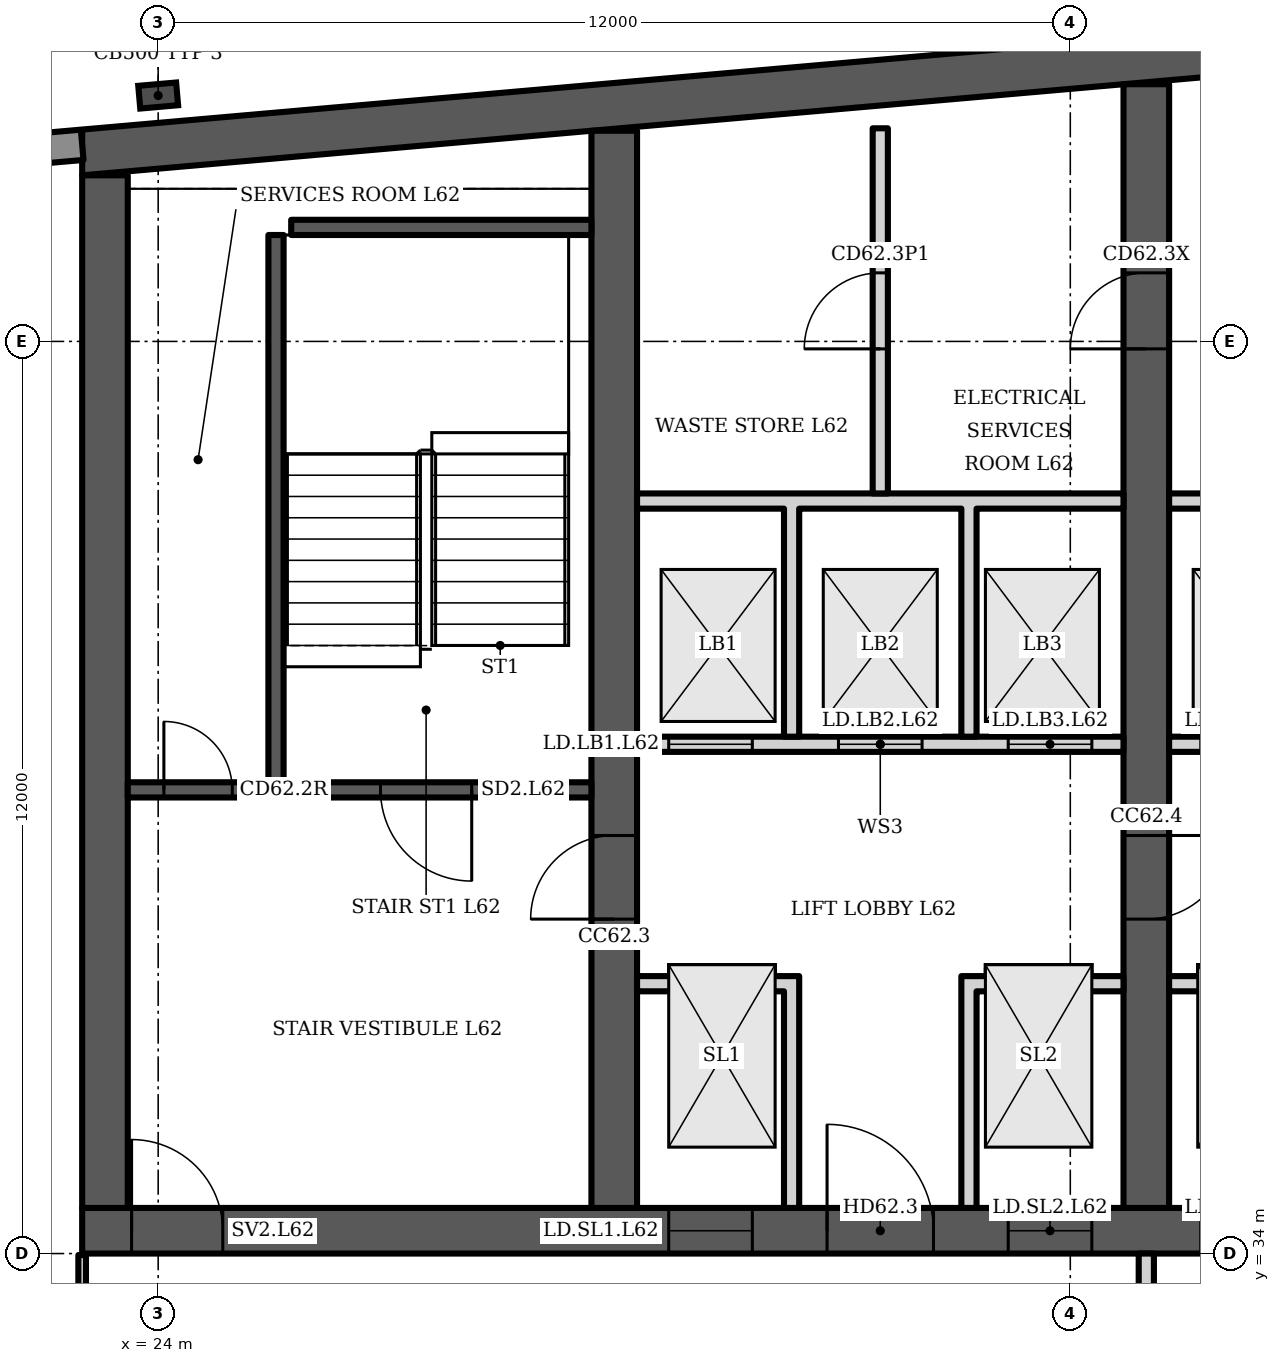
"""IFC4 building model, lengths in metres.
Left out: names, types, materials, properties, quantities, classifications, styles, units other than length and angle.
Written with IfcOpenShell. Run it as: python <this file> out.ifc"""

import sys

from ifc_helpers import new_model, si_unit, direction, frame, frame_2d, origin, origin_2d, place, context, subcontext, project, spatial, polyline, rectangle, i_section, outline, extrude, element, fill, save


model = new_model("IFC4")
c1 = context("Model", 3, precision=1e-05, world=origin(), true_north=direction((0.0, 1.0)))
c2 = subcontext(c1, "Body", "Model", "MODEL_VIEW")
j1 = project(units=[si_unit("LENGTHUNIT", "METRE"), si_unit("PLANEANGLEUNIT", "RADIAN")], contexts=[c1])
p1 = place(None, origin())
s1 = spatial("IfcSite", under=j1, at=p1, CompositionType="ELEMENT")
p2 = place(p1, origin())
s2 = spatial("IfcBuilding", under=s1, at=p2, CompositionType="ELEMENT")
p3 = place(p2, frame((0.0, 0.0, 246.7)))
s3 = spatial("IfcBuildingStorey", under=s2, at=p3, CompositionType="ELEMENT", Elevation=246.7)
p4 = place(p3, origin())
e1 = element("IfcWall", 1, at=p4, inside=s3, PredefinedType="SHEAR", context=c2, shape_type="SweptSolid", body=[
    extrude(outline(polyline([(23.0, 48.185), (40.5, 49.716), (58.0, 48.185), (58.0, 48.787), (40.5, 50.318), (23.0, 48.787), (23.0, 48.185)])), origin(), (0.0, 0.0, 1.0), 3.6),
])
p5 = place(p3, frame((23.0, 34.3, 0.0), z_axis=(0.0, 0.0, 1.0), x_axis=(1.0, 0.0, 0.0)))
e2 = element("IfcWall", 2, at=p5, inside=s3, PredefinedType="SHEAR", context=c2, shape_type="SweptSolid", body=[
    extrude(rectangle(XDim=35.0, YDim=0.6, at=frame_2d((17.5, 0.0))), origin(), (0.0, 0.0, 1.0), 3.6),
])
p6 = place(p5, frame((0.65, 0.0, 0.0)))
e3 = element("IfcOpeningElement", 3, at=p6, cuts=e2, PredefinedType="OPENING", context=c2, shape_type="SweptSolid", body=[
    extrude(rectangle(XDim=1.2, YDim=2.1, at=frame_2d((0.6, 1.05))), frame((0.0, 0.31, 0.0), z_axis=(0.0, -1.0, 0.0), x_axis=(1.0, 0.0, 0.0)), (0.0, 0.0, 1.0), 0.62),
])
p7 = place(p5, frame((7.717, 0.0, 0.0)))
e4 = element("IfcOpeningElement", 4, at=p7, cuts=e2, PredefinedType="OPENING", context=c2, shape_type="SweptSolid", body=[
    extrude(rectangle(XDim=1.1, YDim=2.1, at=frame_2d((0.55, 1.05))), frame((0.0, 0.31, 0.0), z_axis=(0.0, -1.0, 0.0), x_axis=(1.0, 0.0, 0.0)), (0.0, 0.0, 1.0), 0.62),
])
p8 = place(p5, frame((12.183, 0.0, 0.0)))
e5 = element("IfcOpeningElement", 5, at=p8, cuts=e2, PredefinedType="OPENING", context=c2, shape_type="SweptSolid", body=[
    extrude(rectangle(XDim=1.1, YDim=2.1, at=frame_2d((0.55, 1.05))), frame((0.0, 0.31, 0.0), z_axis=(0.0, -1.0, 0.0), x_axis=(1.0, 0.0, 0.0)), (0.0, 0.0, 1.0), 0.62),
])
p9 = place(p5, frame((9.8, 0.0, 0.0)))
e6 = element("IfcOpeningElement", 6, at=p9, cuts=e2, PredefinedType="OPENING", context=c2, shape_type="SweptSolid", body=[
    extrude(rectangle(XDim=1.4, YDim=2.1, at=frame_2d((0.7, 1.05))), frame((0.0, 0.31, 0.0), z_axis=(0.0, -1.0, 0.0), x_axis=(1.0, 0.0, 0.0)), (0.0, 0.0, 1.0), 0.62),
])
p10 = place(p5, frame((14.717, 0.0, 0.0)))
e7 = element("IfcOpeningElement", 7, at=p10, cuts=e2, PredefinedType="OPENING", context=c2, shape_type="SweptSolid", body=[
    extrude(rectangle(XDim=1.1, YDim=2.1, at=frame_2d((0.55, 1.05))), frame((0.0, 0.31, 0.0), z_axis=(0.0, -1.0, 0.0), x_axis=(1.0, 0.0, 0.0)), (0.0, 0.0, 1.0), 0.62),
])
p11 = place(p5, frame((16.95, 0.0, 0.0)))
e8 = element("IfcOpeningElement", 8, at=p11, cuts=e2, PredefinedType="OPENING", context=c2, shape_type="SweptSolid", body=[
    extrude(rectangle(XDim=1.1, YDim=2.1, at=frame_2d((0.55, 1.05))), frame((0.0, 0.31, 0.0), z_axis=(0.0, -1.0, 0.0), x_axis=(1.0, 0.0, 0.0)), (0.0, 0.0, 1.0), 0.62),
])
p12 = place(p5, frame((19.183, 0.0, 0.0)))
e9 = element("IfcOpeningElement", 9, at=p12, cuts=e2, PredefinedType="OPENING", context=c2, shape_type="SweptSolid", body=[
    extrude(rectangle(XDim=1.1, YDim=2.1, at=frame_2d((0.55, 1.05))), frame((0.0, 0.31, 0.0), z_axis=(0.0, -1.0, 0.0), x_axis=(1.0, 0.0, 0.0)), (0.0, 0.0, 1.0), 0.62),
])
p13 = place(p5, frame((26.15, 0.0, 0.0)))
e10 = element("IfcOpeningElement", 10, at=p13, cuts=e2, PredefinedType="OPENING", context=c2, shape_type="SweptSolid", body=[
    extrude(rectangle(XDim=1.2, YDim=2.1, at=frame_2d((0.6, 1.05))), frame((0.0, 0.31, 0.0), z_axis=(0.0, -1.0, 0.0), x_axis=(1.0, 0.0, 0.0)), (0.0, 0.0, 1.0), 0.62),
])
p14 = place(p5, frame((30.8, 0.0, 0.0)))
e11 = element("IfcOpeningElement", 11, at=p14, cuts=e2, PredefinedType="OPENING", context=c2, shape_type="SweptSolid", body=[
    extrude(rectangle(XDim=1.4, YDim=2.1, at=frame_2d((0.7, 1.05))), frame((0.0, 0.31, 0.0), z_axis=(0.0, -1.0, 0.0), x_axis=(1.0, 0.0, 0.0)), (0.0, 0.0, 1.0), 0.62),
])
p15 = place(p3, frame((23.3, 34.6, 0.0), z_axis=(0.0, 0.0, 1.0), x_axis=(0.0, 1.0, 0.0)))
e12 = element("IfcWall", 12, at=p15, inside=s3, PredefinedType="SHEAR", context=c2, shape_type="SweptSolid", body=[
    extrude(rectangle(XDim=13.585, YDim=0.6, at=frame_2d((6.792, 0.0))), origin(), (0.0, 0.0, 1.0), 3.6),
])
p16 = place(p3, frame((30.0, 34.6, 0.0), z_axis=(0.0, 0.0, 1.0), x_axis=(0.0, 1.0, 0.0)))
e13 = element("IfcWall", 13, at=p16, inside=s3, PredefinedType="SHEAR", context=c2, shape_type="SweptSolid", body=[
    extrude(rectangle(XDim=14.171, YDim=0.6, at=frame_2d((7.085, 0.0))), origin(), (0.0, 0.0, 1.0), 3.6),
])
p17 = place(p16, frame((3.8, 0.0, 0.0)))
e14 = element("IfcOpeningElement", 14, at=p17, cuts=e13, PredefinedType="OPENING", context=c2, shape_type="SweptSolid", body=[
    extrude(rectangle(XDim=1.1, YDim=2.1, at=frame_2d((0.55, 1.05))), frame((0.0, 0.31, 0.0), z_axis=(0.0, -1.0, 0.0), x_axis=(1.0, 0.0, 0.0)), (0.0, 0.0, 1.0), 0.62),
])
p18 = place(p3, frame((37.0, 34.6, 0.0), z_axis=(0.0, 0.0, 1.0), x_axis=(0.0, 1.0, 0.0)))
e15 = element("IfcWall", 15, at=p18, inside=s3, PredefinedType="SHEAR", context=c2, shape_type="SweptSolid", body=[
    extrude(rectangle(XDim=14.784, YDim=0.6, at=frame_2d((7.392, 0.0))), origin(), (0.0, 0.0, 1.0), 3.6),
])
p19 = place(p18, frame((11.302, 0.0, 0.0)))
e16 = element("IfcOpeningElement", 16, at=p19, cuts=e15, PredefinedType="OPENING", context=c2, shape_type="SweptSolid", body=[
    extrude(rectangle(XDim=1.0, YDim=2.1, at=frame_2d((0.5, 1.05))), frame((0.0, 0.31, 0.0), z_axis=(0.0, -1.0, 0.0), x_axis=(1.0, 0.0, 0.0)), (0.0, 0.0, 1.0), 0.62),
])
p20 = place(p18, frame((3.8, 0.0, 0.0)))
e17 = element("IfcOpeningElement", 17, at=p20, cuts=e15, PredefinedType="OPENING", context=c2, shape_type="SweptSolid", body=[
    extrude(rectangle(XDim=1.1, YDim=2.1, at=frame_2d((0.55, 1.05))), frame((0.0, 0.31, 0.0), z_axis=(0.0, -1.0, 0.0), x_axis=(1.0, 0.0, 0.0)), (0.0, 0.0, 1.0), 0.62),
])
p21 = place(p3, frame((24.0, 49.235, 0.0), z_axis=(0.0, 0.0, 1.0), x_axis=(-0.087156, 0.996197, 0.0)))
e18 = element("IfcColumn", 18, at=p21, inside=s3, PredefinedType="COLUMN", context=c2, shape_type="SweptSolid", body=[
    extrude(i_section(OverallWidth=0.3, OverallDepth=0.5, WebThickness=0.014, FlangeThickness=0.028, FilletRadius=0.027, at=origin_2d()), origin(), (0.0, 0.0, 1.0), 3.6),
])
p22 = place(p3, frame((23.0, 48.587, 0.0), z_axis=(0.0, 0.0, 1.0), x_axis=(-0.996194, -0.087168, 0.0)))
e19 = element("IfcWall", 19, at=p22, inside=s3, PredefinedType="SOLIDWALL", context=c2, shape_type="SweptSolid", body=[
    extrude(rectangle(XDim=2.994, YDim=0.4, at=frame_2d((1.497, 0.0))), origin(), (0.0, 0.0, 1.0), 3.2),
])
p23 = place(p3, frame((23.6, 40.1, 0.0), z_axis=(0.0, 0.0, 1.0), x_axis=(1.0, 0.0, 0.0)))
e20 = element("IfcWall", 20, at=p23, inside=s3, PredefinedType="SHEAR", context=c2, shape_type="SweptSolid", body=[
    extrude(rectangle(XDim=6.1, YDim=0.2, at=frame_2d((3.05, 0.0))), origin(), (0.0, 0.0, 1.0), 3.2),
])
p24 = place(p23, frame((3.325, 0.0, 0.0)))
e21 = element("IfcOpeningElement", 21, at=p24, cuts=e20, PredefinedType="OPENING", context=c2, shape_type="SweptSolid", body=[
    extrude(rectangle(XDim=1.2, YDim=2.1, at=frame_2d((0.6, 1.05))), frame((0.0, 0.11, 0.0), z_axis=(0.0, -1.0, 0.0), x_axis=(1.0, 0.0, 0.0)), (0.0, 0.0, 1.0), 0.22),
])
p25 = place(p23, frame((0.475, 0.0, 0.0)))
e22 = element("IfcOpeningElement", 22, at=p25, cuts=e20, PredefinedType="OPENING", context=c2, shape_type="SweptSolid", body=[
    extrude(rectangle(XDim=0.9, YDim=2.1, at=frame_2d((0.45, 1.05))), frame((0.0, 0.11, 0.0), z_axis=(0.0, -1.0, 0.0), x_axis=(1.0, 0.0, 0.0)), (0.0, 0.0, 1.0), 0.22),
])
p26 = place(p3, frame((25.55, 40.2, 0.0), z_axis=(0.0, 0.0, 1.0), x_axis=(0.0, 1.0, 0.0)))
e23 = element("IfcWall", 23, at=p26, inside=s3, PredefinedType="SHEAR", context=c2, shape_type="SweptSolid", body=[
    extrude(rectangle(XDim=7.2, YDim=0.2, at=frame_2d((3.6, 0.0))), origin(), (0.0, 0.0, 1.0), 3.2),
])
p27 = place(p3, frame((25.75, 47.5, 0.0), z_axis=(0.0, 0.0, 1.0), x_axis=(1.0, 0.0, 0.0)))
e24 = element("IfcWall", 24, at=p27, inside=s3, PredefinedType="SHEAR", context=c2, shape_type="SweptSolid", body=[
    extrude(rectangle(XDim=3.95, YDim=0.2, at=frame_2d((1.975, 0.0))), origin(), (0.0, 0.0, 1.0), 3.2),
])
p28 = place(p3, frame((30.3, 40.7, 0.0), z_axis=(0.0, 0.0, 1.0), x_axis=(1.0, 0.0, 0.0)))
e25 = element("IfcWall", 25, at=p28, inside=s3, PredefinedType="PARTITIONING", context=c2, shape_type="SweptSolid", body=[
    extrude(rectangle(XDim=6.4, YDim=0.2, at=frame_2d((3.2, 0.0))), origin(), (0.0, 0.0, 1.0), 3.2),
])
p29 = place(p28, frame((0.417, 0.0, 0.0)))
e26 = element("IfcOpeningElement", 26, at=p29, cuts=e25, PredefinedType="OPENING", context=c2, shape_type="SweptSolid", body=[
    extrude(rectangle(XDim=1.1, YDim=2.1, at=frame_2d((0.55, 1.05))), frame((0.0, 0.11, 0.0), z_axis=(0.0, -1.0, 0.0), x_axis=(1.0, 0.0, 0.0)), (0.0, 0.0, 1.0), 0.22),
])
p30 = place(p28, frame((2.65, 0.0, 0.0)))
e27 = element("IfcOpeningElement", 27, at=p30, cuts=e25, PredefinedType="OPENING", context=c2, shape_type="SweptSolid", body=[
    extrude(rectangle(XDim=1.1, YDim=2.1, at=frame_2d((0.55, 1.05))), frame((0.0, 0.11, 0.0), z_axis=(0.0, -1.0, 0.0), x_axis=(1.0, 0.0, 0.0)), (0.0, 0.0, 1.0), 0.22),
])
p31 = place(p28, frame((4.883, 0.0, 0.0)))
e28 = element("IfcOpeningElement", 28, at=p31, cuts=e25, PredefinedType="OPENING", context=c2, shape_type="SweptSolid", body=[
    extrude(rectangle(XDim=1.1, YDim=2.1, at=frame_2d((0.55, 1.05))), frame((0.0, 0.11, 0.0), z_axis=(0.0, -1.0, 0.0), x_axis=(1.0, 0.0, 0.0)), (0.0, 0.0, 1.0), 0.22),
])
p32 = place(p3, frame((0.0, 0.0, -0.0)))
e29 = element("IfcWall", 29, at=p32, inside=s3, PredefinedType="PARTITIONING", context=c2, shape_type="SweptSolid", body=[
    extrude(outline(polyline([(32.233, 37.45), (30.3, 37.45), (30.3, 37.65), (32.233, 37.65), (32.433, 37.65), (32.433, 34.6), (32.233, 34.6), (32.233, 37.45)])), origin(), (0.0, 0.0, 1.0), 3.2),
])
p33 = place(p3, frame((0.0, 0.0, -0.0)))
e30 = element("IfcWall", 30, at=p33, inside=s3, PredefinedType="PARTITIONING", context=c2, shape_type="SweptSolid", body=[
    extrude(outline(polyline([(34.567, 37.65), (34.767, 37.65), (36.7, 37.65), (36.7, 37.45), (34.767, 37.45), (34.767, 34.6), (34.567, 34.6), (34.567, 37.65)])), origin(), (0.0, 0.0, 1.0), 3.2),
])
p34 = place(p3, frame((0.0, 0.0, -0.0)))
e31 = element("IfcWall", 31, at=p34, inside=s3, PredefinedType="PARTITIONING", context=c2, shape_type="SweptSolid", body=[
    extrude(outline(polyline([(32.433, 40.8), (32.233, 40.8), (32.233, 43.8), (30.3, 43.8), (30.3, 44.0), (36.7, 44.0), (36.7, 43.8), (34.767, 43.8), (34.767, 40.8), (34.567, 40.8), (34.567, 43.8), (32.433, 43.8), (32.433, 40.8)])), origin(), (0.0, 0.0, 1.0), 3.2),
])
p35 = place(p3, frame((33.5, 44.0, 0.0), z_axis=(0.0, 0.0, 1.0), x_axis=(0.0, 1.0, 0.0)))
e32 = element("IfcWall", 32, at=p35, inside=s3, PredefinedType="PARTITIONING", context=c2, shape_type="SweptSolid", body=[
    extrude(rectangle(XDim=4.804, YDim=0.2, at=frame_2d((2.402, 0.0))), origin(), (0.0, 0.0, 1.0), 3.2),
])
p36 = place(p35, frame((1.902, 0.0, 0.0)))
e33 = element("IfcOpeningElement", 33, at=p36, cuts=e32, PredefinedType="OPENING", context=c2, shape_type="SweptSolid", body=[
    extrude(rectangle(XDim=1.0, YDim=2.1, at=frame_2d((0.5, 1.05))), frame((0.0, 0.11, 0.0), z_axis=(0.0, -1.0, 0.0), x_axis=(1.0, 0.0, 0.0)), (0.0, 0.0, 1.0), 0.22),
])
p37 = place(p3, frame((37.3, 40.7, 0.0), z_axis=(0.0, 0.0, 1.0), x_axis=(1.0, 0.0, 0.0)))
e34 = element("IfcWall", 34, at=p37, inside=s3, PredefinedType="PARTITIONING", context=c2, shape_type="SweptSolid", body=[
    extrude(rectangle(XDim=6.4, YDim=0.2, at=frame_2d((3.2, 0.0))), origin(), (0.0, 0.0, 1.0), 3.2),
])
p38 = place(p37, frame((0.417, 0.0, 0.0)))
e35 = element("IfcOpeningElement", 35, at=p38, cuts=e34, PredefinedType="OPENING", context=c2, shape_type="SweptSolid", body=[
    extrude(rectangle(XDim=1.1, YDim=2.1, at=frame_2d((0.55, 1.05))), frame((0.0, 0.11, 0.0), z_axis=(0.0, -1.0, 0.0), x_axis=(1.0, 0.0, 0.0)), (0.0, 0.0, 1.0), 0.22),
])
p39 = place(p37, frame((2.65, 0.0, 0.0)))
e36 = element("IfcOpeningElement", 36, at=p39, cuts=e34, PredefinedType="OPENING", context=c2, shape_type="SweptSolid", body=[
    extrude(rectangle(XDim=1.1, YDim=2.1, at=frame_2d((0.55, 1.05))), frame((0.0, 0.11, 0.0), z_axis=(0.0, -1.0, 0.0), x_axis=(1.0, 0.0, 0.0)), (0.0, 0.0, 1.0), 0.22),
])
p40 = place(p37, frame((4.883, 0.0, 0.0)))
e37 = element("IfcOpeningElement", 37, at=p40, cuts=e34, PredefinedType="OPENING", context=c2, shape_type="SweptSolid", body=[
    extrude(rectangle(XDim=1.1, YDim=2.1, at=frame_2d((0.55, 1.05))), frame((0.0, 0.11, 0.0), z_axis=(0.0, -1.0, 0.0), x_axis=(1.0, 0.0, 0.0)), (0.0, 0.0, 1.0), 0.22),
])
p41 = place(p3, frame((0.0, 0.0, -0.0)))
e38 = element("IfcWall", 38, at=p41, inside=s3, PredefinedType="PARTITIONING", context=c2, shape_type="SweptSolid", body=[
    extrude(outline(polyline([(41.567, 37.1), (39.433, 37.1), (39.433, 34.6), (39.233, 34.6), (39.233, 37.45), (37.3, 37.45), (37.3, 37.65), (39.233, 37.65), (39.433, 37.65), (39.433, 37.3), (41.567, 37.3), (41.567, 37.35), (41.767, 37.35), (43.7, 37.35), (43.7, 37.15), (41.767, 37.15), (41.767, 34.6), (41.567, 34.6), (41.567, 37.1)])), origin(), (0.0, 0.0, 1.0), 3.2),
])
p42 = place(p3, frame((0.0, 0.0, -0.0)))
e39 = element("IfcWall", 39, at=p42, inside=s3, PredefinedType="PARTITIONING", context=c2, shape_type="SweptSolid", body=[
    extrude(outline(polyline([(39.433, 40.8), (39.233, 40.8), (39.233, 43.8), (37.3, 43.8), (37.3, 44.0), (43.7, 44.0), (43.7, 43.8), (41.767, 43.8), (41.767, 40.8), (41.567, 40.8), (41.567, 43.8), (39.433, 43.8), (39.433, 40.8)])), origin(), (0.0, 0.0, 1.0), 3.2),
])
p43 = place(p3, frame((37.0, 30.5, 0.0), z_axis=(0.0, 0.0, 1.0), x_axis=(0.0, 1.0, 0.0)))
e40 = element("IfcWall", 40, at=p43, inside=s3, PredefinedType="PARTITIONING", context=c2, shape_type="SweptSolid", body=[
    extrude(rectangle(XDim=3.5, YDim=0.2, at=frame_2d((1.75, 0.0))), origin(), (0.0, 0.0, 1.0), 3.2),
])
p44 = place(p43, frame((1.2, 0.0, 0.0)))
e41 = element("IfcOpeningElement", 41, at=p44, cuts=e40, PredefinedType="OPENING", context=c2, shape_type="SweptSolid", body=[
    extrude(rectangle(XDim=1.1, YDim=2.1, at=frame_2d((0.55, 1.05))), frame((0.0, 0.11, 0.0), z_axis=(0.0, -1.0, 0.0), x_axis=(1.0, 0.0, 0.0)), (0.0, 0.0, 1.0), 0.22),
])
p45 = place(p3, frame((23.0, 30.5, 0.0), z_axis=(0.0, 0.0, 1.0), x_axis=(0.0, 1.0, 0.0)))
e42 = element("IfcWall", 42, at=p45, inside=s3, PredefinedType="PARTITIONING", context=c2, shape_type="SweptSolid", body=[
    extrude(rectangle(XDim=3.48, YDim=0.1, at=frame_2d((1.74, 0.0))), origin(), (0.0, 0.0, 1.0), 3.2),
])
p46 = place(p24, origin())
e43 = element("IfcDoor", 43, at=p46, inside=s3, OperationType="SINGLE_SWING_RIGHT", PredefinedType="DOOR", context=c2, shape_type="SweptSolid", body=[
    extrude(rectangle(XDim=1.2, YDim=2.1, at=frame_2d((0.6, 1.05))), frame((0.0, 0.025, 0.0), z_axis=(0.0, -1.0, 0.0), x_axis=(1.0, 0.0, 0.0)), (0.0, 0.0, 1.0), 0.05),
])
fill(e21, e43)
p47 = place(p25, origin())
e44 = element("IfcDoor", 44, at=p47, inside=s3, OperationType="SINGLE_SWING_LEFT", PredefinedType="DOOR", context=c2, shape_type="SweptSolid", body=[
    extrude(rectangle(XDim=0.9, YDim=2.1, at=frame_2d((0.45, 1.05))), frame((0.0, 0.025, 0.0), z_axis=(0.0, -1.0, 0.0), x_axis=(1.0, 0.0, 0.0)), (0.0, 0.0, 1.0), 0.05),
])
fill(e22, e44)
p48 = place(p6, origin())
e45 = element("IfcDoor", 45, at=p48, inside=s3, OperationType="SINGLE_SWING_LEFT", PredefinedType="DOOR", context=c2, shape_type="SweptSolid", body=[
    extrude(rectangle(XDim=1.2, YDim=2.1, at=frame_2d((0.6, 1.05))), frame((0.0, 0.025, 0.0), z_axis=(0.0, -1.0, 0.0), x_axis=(1.0, 0.0, 0.0)), (0.0, 0.0, 1.0), 0.05),
])
fill(e3, e45)
p49 = place(p7, origin())
e46 = element("IfcDoor", 46, at=p49, inside=s3, OperationType="DOUBLE_DOOR_SLIDING", PredefinedType="DOOR", context=c2, shape_type="SweptSolid", body=[
    extrude(rectangle(XDim=1.1, YDim=2.1, at=frame_2d((0.55, 1.05))), frame((0.0, 0.025, 0.0), z_axis=(0.0, -1.0, 0.0), x_axis=(1.0, 0.0, 0.0)), (0.0, 0.0, 1.0), 0.05),
])
fill(e4, e46)
p50 = place(p8, origin())
e47 = element("IfcDoor", 47, at=p50, inside=s3, OperationType="DOUBLE_DOOR_SLIDING", PredefinedType="DOOR", context=c2, shape_type="SweptSolid", body=[
    extrude(rectangle(XDim=1.1, YDim=2.1, at=frame_2d((0.55, 1.05))), frame((0.0, 0.025, 0.0), z_axis=(0.0, -1.0, 0.0), x_axis=(1.0, 0.0, 0.0)), (0.0, 0.0, 1.0), 0.05),
])
fill(e5, e47)
p51 = place(p9, origin())
e48 = element("IfcDoor", 48, at=p51, inside=s3, OperationType="DOUBLE_DOOR_SINGLE_SWING", PredefinedType="DOOR", context=c2, shape_type="SweptSolid", body=[
    extrude(rectangle(XDim=1.4, YDim=2.1, at=frame_2d((0.7, 1.05))), frame((0.0, 0.025, 0.0), z_axis=(0.0, -1.0, 0.0), x_axis=(1.0, 0.0, 0.0)), (0.0, 0.0, 1.0), 0.05),
])
fill(e6, e48)
p52 = place(p29, origin())
e49 = element("IfcDoor", 49, at=p52, inside=s3, OperationType="DOUBLE_DOOR_SLIDING", PredefinedType="DOOR", context=c2, shape_type="SweptSolid", body=[
    extrude(rectangle(XDim=1.1, YDim=2.1, at=frame_2d((0.55, 1.05))), frame((0.0, 0.025, 0.0), z_axis=(0.0, -1.0, 0.0), x_axis=(1.0, 0.0, 0.0)), (0.0, 0.0, 1.0), 0.05),
])
fill(e26, e49)
p53 = place(p30, origin())
e50 = element("IfcDoor", 50, at=p53, inside=s3, OperationType="DOUBLE_DOOR_SLIDING", PredefinedType="DOOR", context=c2, shape_type="SweptSolid", body=[
    extrude(rectangle(XDim=1.1, YDim=2.1, at=frame_2d((0.55, 1.05))), frame((0.0, 0.025, 0.0), z_axis=(0.0, -1.0, 0.0), x_axis=(1.0, 0.0, 0.0)), (0.0, 0.0, 1.0), 0.05),
])
fill(e27, e50)
p54 = place(p31, origin())
e51 = element("IfcDoor", 51, at=p54, inside=s3, OperationType="DOUBLE_DOOR_SLIDING", PredefinedType="DOOR", context=c2, shape_type="SweptSolid", body=[
    extrude(rectangle(XDim=1.1, YDim=2.1, at=frame_2d((0.55, 1.05))), frame((0.0, 0.025, 0.0), z_axis=(0.0, -1.0, 0.0), x_axis=(1.0, 0.0, 0.0)), (0.0, 0.0, 1.0), 0.05),
])
fill(e28, e51)
p55 = place(p36, origin())
e52 = element("IfcDoor", 52, at=p55, inside=s3, OperationType="SINGLE_SWING_LEFT", PredefinedType="DOOR", context=c2, shape_type="SweptSolid", body=[
    extrude(rectangle(XDim=1.0, YDim=2.1, at=frame_2d((0.5, 1.05))), frame((0.0, 0.025, 0.0), z_axis=(0.0, -1.0, 0.0), x_axis=(1.0, 0.0, 0.0)), (0.0, 0.0, 1.0), 0.05),
])
fill(e33, e52)
p56 = place(p19, origin())
e53 = element("IfcDoor", 53, at=p56, inside=s3, OperationType="SINGLE_SWING_LEFT", PredefinedType="DOOR", context=c2, shape_type="SweptSolid", body=[
    extrude(rectangle(XDim=1.0, YDim=2.1, at=frame_2d((0.5, 1.05))), frame((0.0, 0.025, 0.0), z_axis=(0.0, -1.0, 0.0), x_axis=(1.0, 0.0, 0.0)), (0.0, 0.0, 1.0), 0.05),
])
fill(e16, e53)
p57 = place(p17, origin())
e54 = element("IfcDoor", 54, at=p57, inside=s3, OperationType="SINGLE_SWING_LEFT", PredefinedType="DOOR", context=c2, shape_type="SweptSolid", body=[
    extrude(rectangle(XDim=1.1, YDim=2.1, at=frame_2d((0.55, 1.05))), frame((0.0, 0.025, 0.0), z_axis=(0.0, -1.0, 0.0), x_axis=(1.0, 0.0, 0.0)), (0.0, 0.0, 1.0), 0.05),
])
fill(e14, e54)
p58 = place(p20, origin())
e55 = element("IfcDoor", 55, at=p58, inside=s3, OperationType="SINGLE_SWING_RIGHT", PredefinedType="DOOR", context=c2, shape_type="SweptSolid", body=[
    extrude(rectangle(XDim=1.1, YDim=2.1, at=frame_2d((0.55, 1.05))), frame((0.0, 0.025, 0.0), z_axis=(0.0, -1.0, 0.0), x_axis=(1.0, 0.0, 0.0)), (0.0, 0.0, 1.0), 0.05),
])
fill(e17, e55)
save(model, sys.argv[1])
